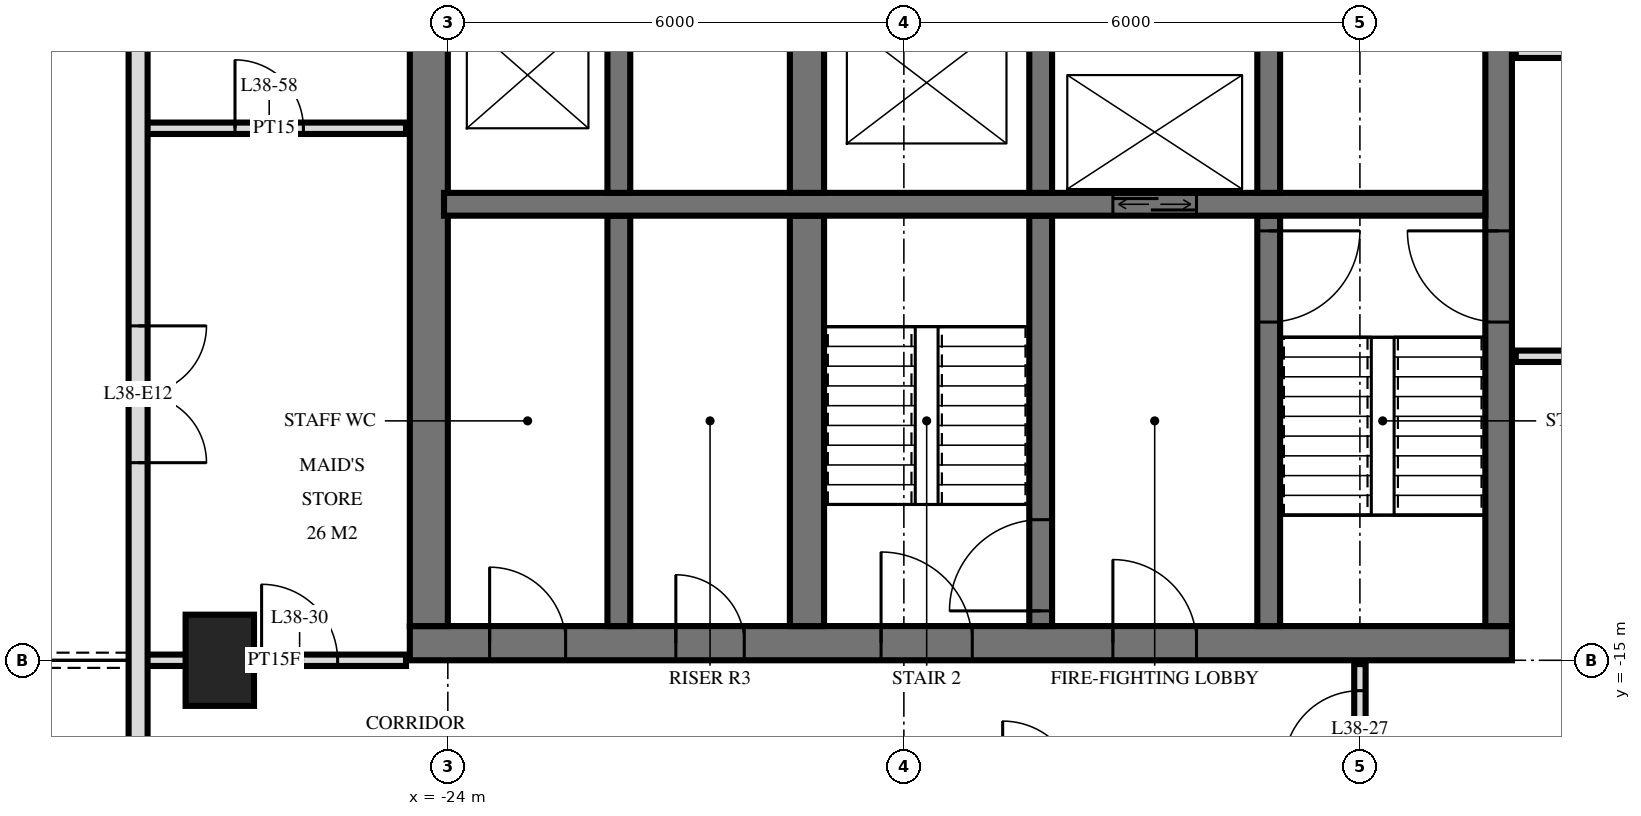
"""IFC4 building model, lengths in metres.
Left out: names, types, materials, properties, quantities, classifications, styles, units other than length and angle.
Written with IfcOpenShell. Run it as: python <this file> out.ifc"""

import sys

from ifc_helpers import new_model, si_unit, direction, frame, frame_2d, origin, origin_2d, place, context, subcontext, project, spatial, rectangle, extrude, element, fill, save


model = new_model("IFC4")
c1 = context("Model", 3, precision=1e-05, world=origin(), true_north=direction((0.0, 1.0)))
c2 = subcontext(c1, "Body", "Model", "MODEL_VIEW")
j1 = project(units=[si_unit("LENGTHUNIT", "METRE"), si_unit("PLANEANGLEUNIT", "RADIAN")], contexts=[c1])
p1 = place(None, origin())
s1 = spatial("IfcSite", under=j1, at=p1, CompositionType="ELEMENT")
p2 = place(p1, origin())
s2 = spatial("IfcBuilding", under=s1, at=p2, CompositionType="ELEMENT")
p3 = place(p2, frame((0.0, 0.0, 148.8)))
s3 = spatial("IfcBuildingStorey", under=s2, at=p3, CompositionType="ELEMENT", Elevation=148.8)
p4 = place(p3, frame((-27.0, -15.0, 0.0), z_axis=(0.0, 0.0, 1.0), x_axis=(0.0, 1.0, 0.0)))
e1 = element("IfcColumn", 1, at=p4, inside=s3, PredefinedType="COLUMN", context=c2, shape_type="SweptSolid", body=[
    extrude(rectangle(XDim=1.2, YDim=0.9, at=origin_2d()), origin(), (0.0, 0.0, 1.0), 3.6),
])
p5 = place(p3, frame((-24.5, -14.775, 0.0), z_axis=(0.0, 0.0, 1.0), x_axis=(1.0, 0.0, 0.0)))
e2 = element("IfcWall", 2, at=p5, inside=s3, PredefinedType="SHEAR", context=c2, shape_type="SweptSolid", body=[
    extrude(rectangle(XDim=14.5, YDim=0.45, at=frame_2d((7.25, 0.0))), origin(), (0.0, 0.0, 1.0), 3.6),
])
p6 = place(p5, frame((6.2, 0.0, 0.0)))
e3 = element("IfcOpeningElement", 3, at=p6, cuts=e2, PredefinedType="OPENING", context=c2, shape_type="SweptSolid", body=[
    extrude(rectangle(XDim=1.2, YDim=2.1, at=frame_2d((0.6, 1.05))), frame((0.0, 0.235, 0.0), z_axis=(0.0, -1.0, 0.0), x_axis=(1.0, 0.0, 0.0)), (0.0, 0.0, 1.0), 0.47),
])
p7 = place(p5, frame((9.25, 0.0, 0.0)))
e4 = element("IfcOpeningElement", 4, at=p7, cuts=e2, PredefinedType="OPENING", context=c2, shape_type="SweptSolid", body=[
    extrude(rectangle(XDim=1.1, YDim=2.1, at=frame_2d((0.55, 1.05))), frame((0.0, 0.235, 0.0), z_axis=(0.0, -1.0, 0.0), x_axis=(1.0, 0.0, 0.0)), (0.0, 0.0, 1.0), 0.47),
])
p8 = place(p5, frame((3.5, 0.0, 0.0)))
e5 = element("IfcOpeningElement", 5, at=p8, cuts=e2, PredefinedType="OPENING", context=c2, shape_type="SweptSolid", body=[
    extrude(rectangle(XDim=0.9, YDim=2.1, at=frame_2d((0.45, 1.05))), frame((0.0, 0.235, 0.0), z_axis=(0.0, -1.0, 0.0), x_axis=(1.0, 0.0, 0.0)), (0.0, 0.0, 1.0), 0.47),
])
p9 = place(p5, frame((1.05, 0.0, 0.0)))
e6 = element("IfcOpeningElement", 6, at=p9, cuts=e2, PredefinedType="OPENING", context=c2, shape_type="SweptSolid", body=[
    extrude(rectangle(XDim=1.0, YDim=2.1, at=frame_2d((0.5, 1.05))), frame((0.0, 0.235, 0.0), z_axis=(0.0, -1.0, 0.0), x_axis=(1.0, 0.0, 0.0)), (0.0, 0.0, 1.0), 0.47),
])
p10 = place(p3, frame((-10.175, -14.55, 0.0), z_axis=(0.0, 0.0, 1.0), x_axis=(0.0, 1.0, 0.0)))
e7 = element("IfcWall", 7, at=p10, inside=s3, PredefinedType="SHEAR", context=c2, shape_type="SweptSolid", body=[
    extrude(rectangle(XDim=14.1, YDim=0.35, at=frame_2d((7.05, 0.0))), origin(), (0.0, 0.0, 1.0), 3.6),
])
p11 = place(p10, frame((8.4, 0.0, 0.0)))
e8 = element("IfcOpeningElement", 8, at=p11, cuts=e7, PredefinedType="OPENING", context=c2, shape_type="SweptSolid", body=[
    extrude(rectangle(XDim=1.4, YDim=2.4, at=frame_2d((0.7, 1.2))), frame((0.0, 0.185, 0.0), z_axis=(0.0, -1.0, 0.0), x_axis=(1.0, 0.0, 0.0)), (0.0, 0.0, 1.0), 0.37),
])
p12 = place(p10, frame((10.0, 0.0, 0.0)))
e9 = element("IfcOpeningElement", 9, at=p12, cuts=e7, PredefinedType="OPENING", context=c2, shape_type="SweptSolid", body=[
    extrude(rectangle(XDim=1.4, YDim=2.4, at=frame_2d((0.7, 1.2))), frame((0.0, 0.185, 0.0), z_axis=(0.0, -1.0, 0.0), x_axis=(1.0, 0.0, 0.0)), (0.0, 0.0, 1.0), 0.37),
])
p13 = place(p10, frame((4.0, 0.0, 0.0)))
e10 = element("IfcOpeningElement", 10, at=p13, cuts=e7, PredefinedType="OPENING", context=c2, shape_type="SweptSolid", body=[
    extrude(rectangle(XDim=1.2, YDim=2.1, at=frame_2d((0.6, 1.05))), frame((0.0, 0.185, 0.0), z_axis=(0.0, -1.0, 0.0), x_axis=(1.0, 0.0, 0.0)), (0.0, 0.0, 1.0), 0.37),
])
p14 = place(p3, frame((-24.25, -14.55, 0.0), z_axis=(0.0, 0.0, 1.0), x_axis=(0.0, 1.0, 0.0)))
e11 = element("IfcWall", 11, at=p14, inside=s3, PredefinedType="SHEAR", context=c2, shape_type="SweptSolid", body=[
    extrude(rectangle(XDim=14.1, YDim=0.5, at=frame_2d((7.05, 0.0))), origin(), (0.0, 0.0, 1.0), 3.6),
])
p15 = place(p3, frame((-24.05, -9.0, 0.0), z_axis=(0.0, 0.0, 1.0), x_axis=(1.0, 0.0, 0.0)))
e12 = element("IfcWall", 12, at=p15, inside=s3, PredefinedType="SHEAR", context=c2, shape_type="SweptSolid", body=[
    extrude(rectangle(XDim=13.7, YDim=0.3, at=frame_2d((6.85, 0.0))), origin(), (0.0, 0.0, 1.0), 3.6),
])
p16 = place(p15, frame((8.8, 0.0, 0.0)))
e13 = element("IfcOpeningElement", 13, at=p16, cuts=e12, PredefinedType="OPENING", context=c2, shape_type="SweptSolid", body=[
    extrude(rectangle(XDim=1.1, YDim=2.1, at=frame_2d((0.55, 1.05))), frame((0.0, 0.16, 0.0), z_axis=(0.0, -1.0, 0.0), x_axis=(1.0, 0.0, 0.0)), (0.0, 0.0, 1.0), 0.32),
])
p17 = place(p3, frame((-13.2, -8.85, 0.0), z_axis=(0.0, 0.0, 1.0), x_axis=(0.0, 1.0, 0.0)))
e14 = element("IfcWall", 14, at=p17, inside=s3, PredefinedType="SHEAR", context=c2, shape_type="SweptSolid", body=[
    extrude(rectangle(XDim=2.3, YDim=0.3, at=frame_2d((1.15, 0.0))), origin(), (0.0, 0.0, 1.0), 3.6),
])
p18 = place(p3, frame((-13.2, -14.55, 0.0), z_axis=(0.0, 0.0, 1.0), x_axis=(0.0, 1.0, 0.0)))
e15 = element("IfcWall", 15, at=p18, inside=s3, PredefinedType="SHEAR", context=c2, shape_type="SweptSolid", body=[
    extrude(rectangle(XDim=5.4, YDim=0.3, at=frame_2d((2.7, 0.0))), origin(), (0.0, 0.0, 1.0), 3.6),
])
p19 = place(p18, frame((4.0, 0.0, 0.0)))
e16 = element("IfcOpeningElement", 16, at=p19, cuts=e15, PredefinedType="OPENING", context=c2, shape_type="SweptSolid", body=[
    extrude(rectangle(XDim=1.2, YDim=2.1, at=frame_2d((0.6, 1.05))), frame((0.0, 0.16, 0.0), z_axis=(0.0, -1.0, 0.0), x_axis=(1.0, 0.0, 0.0)), (0.0, 0.0, 1.0), 0.32),
])
p20 = place(p3, frame((-16.2, -8.85, 0.0), z_axis=(0.0, 0.0, 1.0), x_axis=(0.0, 1.0, 0.0)))
e17 = element("IfcWall", 17, at=p20, inside=s3, PredefinedType="SHEAR", context=c2, shape_type="SweptSolid", body=[
    extrude(rectangle(XDim=2.3, YDim=0.3, at=frame_2d((1.15, 0.0))), origin(), (0.0, 0.0, 1.0), 3.6),
])
p21 = place(p3, frame((-16.2, -14.55, 0.0), z_axis=(0.0, 0.0, 1.0), x_axis=(0.0, 1.0, 0.0)))
e18 = element("IfcWall", 18, at=p21, inside=s3, PredefinedType="SHEAR", context=c2, shape_type="SweptSolid", body=[
    extrude(rectangle(XDim=5.4, YDim=0.3, at=frame_2d((2.7, 0.0))), origin(), (0.0, 0.0, 1.0), 3.6),
])
p22 = place(p21, frame((0.2, 0.0, 0.0)))
e19 = element("IfcOpeningElement", 19, at=p22, cuts=e18, PredefinedType="OPENING", context=c2, shape_type="SweptSolid", body=[
    extrude(rectangle(XDim=1.2, YDim=2.1, at=frame_2d((0.6, 1.05))), frame((0.0, 0.16, 0.0), z_axis=(0.0, -1.0, 0.0), x_axis=(1.0, 0.0, 0.0)), (0.0, 0.0, 1.0), 0.32),
])
p23 = place(p3, frame((-19.275, -8.85, 0.0), z_axis=(0.0, 0.0, 1.0), x_axis=(0.0, 1.0, 0.0)))
e20 = element("IfcWall", 20, at=p23, inside=s3, PredefinedType="SHEAR", context=c2, shape_type="SweptSolid", body=[
    extrude(rectangle(XDim=2.3, YDim=0.45, at=frame_2d((1.15, 0.0))), origin(), (0.0, 0.0, 1.0), 3.6),
])
p24 = place(p3, frame((-19.275, -14.55, 0.0), z_axis=(0.0, 0.0, 1.0), x_axis=(0.0, 1.0, 0.0)))
e21 = element("IfcWall", 21, at=p24, inside=s3, PredefinedType="SHEAR", context=c2, shape_type="SweptSolid", body=[
    extrude(rectangle(XDim=5.4, YDim=0.45, at=frame_2d((2.7, 0.0))), origin(), (0.0, 0.0, 1.0), 3.6),
])
p25 = place(p3, frame((-21.75, -8.85, 0.0), z_axis=(0.0, 0.0, 1.0), x_axis=(0.0, 1.0, 0.0)))
e22 = element("IfcWall", 22, at=p25, inside=s3, PredefinedType="SHEAR", context=c2, shape_type="SweptSolid", body=[
    extrude(rectangle(XDim=2.3, YDim=0.3, at=frame_2d((1.15, 0.0))), origin(), (0.0, 0.0, 1.0), 3.6),
])
p26 = place(p3, frame((-21.75, -14.55, 0.0), z_axis=(0.0, 0.0, 1.0), x_axis=(0.0, 1.0, 0.0)))
e23 = element("IfcWall", 23, at=p26, inside=s3, PredefinedType="SHEAR", context=c2, shape_type="SweptSolid", body=[
    extrude(rectangle(XDim=5.4, YDim=0.3, at=frame_2d((2.7, 0.0))), origin(), (0.0, 0.0, 1.0), 3.6),
])
p27 = place(p3, frame((-28.075, -3.325, 0.0), z_axis=(0.0, 0.0, 1.0), x_axis=(0.0, -1.0, 0.0)))
e24 = element("IfcWall", 24, at=p27, inside=s3, PredefinedType="SOLIDWALL", context=c2, shape_type="SweptSolid", body=[
    extrude(rectangle(XDim=25.951, YDim=0.25, at=frame_2d((12.975, 0.0))), origin(), (0.0, 0.0, 1.0), 3.32),
])
p28 = place(p27, frame((7.275, 0.0, 0.0)))
e25 = element("IfcOpeningElement", 25, at=p28, cuts=e24, PredefinedType="OPENING", context=c2, shape_type="SweptSolid", body=[
    extrude(rectangle(XDim=1.8, YDim=2.4, at=frame_2d((0.9, 1.2))), frame((0.0, 0.135, 0.0), z_axis=(0.0, -1.0, 0.0), x_axis=(1.0, 0.0, 0.0)), (0.0, 0.0, 1.0), 0.27),
])
p29 = place(p27, frame((18.175, 0.0, 0.0)))
e26 = element("IfcOpeningElement", 26, at=p29, cuts=e24, PredefinedType="OPENING", context=c2, shape_type="SweptSolid", body=[
    extrude(rectangle(XDim=1.8, YDim=2.4, at=frame_2d((0.9, 1.2))), frame((0.0, 0.135, 0.0), z_axis=(0.0, -1.0, 0.0), x_axis=(1.0, 0.0, 0.0)), (0.0, 0.0, 1.0), 0.27),
])
p30 = place(p27, frame((21.075, 0.0, 0.0)))
e27 = element("IfcOpeningElement", 27, at=p30, cuts=e24, PredefinedType="OPENING", context=c2, shape_type="SweptSolid", body=[
    extrude(rectangle(XDim=1.8, YDim=2.4, at=frame_2d((0.9, 1.2))), frame((0.0, 0.135, 0.0), z_axis=(0.0, -1.0, 0.0), x_axis=(1.0, 0.0, 0.0)), (0.0, 0.0, 1.0), 0.27),
])
p31 = place(p27, frame((23.825, 0.0, 0.3)))
e28 = element("IfcOpeningElement", 28, at=p31, cuts=e24, PredefinedType="OPENING", context=c2, shape_type="SweptSolid", body=[
    extrude(rectangle(XDim=1.8, YDim=2.1, at=frame_2d((0.9, 1.05))), frame((0.0, 0.135, 0.0), z_axis=(0.0, -1.0, 0.0), x_axis=(1.0, 0.0, 0.0)), (0.0, 0.0, 1.0), 0.27),
])
p32 = place(p3, frame((-12.0, -16.8, 0.0), z_axis=(0.0, 0.0, 1.0), x_axis=(0.0, 1.0, 0.0)))
e29 = element("IfcWall", 29, at=p32, inside=s3, PredefinedType="PARTITIONING", context=c2, shape_type="SweptSolid", body=[
    extrude(rectangle(XDim=1.75, YDim=0.15, at=frame_2d((0.875, 0.0))), origin(), (0.0, 0.0, 1.0), 3.32),
])
p33 = place(p32, frame((0.4, 0.0, 0.0)))
e30 = element("IfcOpeningElement", 30, at=p33, cuts=e29, PredefinedType="OPENING", context=c2, shape_type="SweptSolid", body=[
    extrude(rectangle(XDim=1.0, YDim=2.1, at=frame_2d((0.5, 1.05))), frame((0.0, 0.085, 0.0), z_axis=(0.0, -1.0, 0.0), x_axis=(1.0, 0.0, 0.0)), (0.0, 0.0, 1.0), 0.17),
])
p34 = place(p3, frame((-28.02, -15.0, 0.0), z_axis=(0.0, 0.0, 1.0), x_axis=(1.0, 0.0, 0.0)))
e31 = element("IfcWall", 31, at=p34, inside=s3, PredefinedType="PARTITIONING", context=c2, shape_type="SweptSolid", body=[
    extrude(rectangle(XDim=3.47, YDim=0.15, at=frame_2d((1.735, 0.0))), origin(), (0.0, 0.0, 1.0), 3.32),
])
p35 = place(p34, frame((1.57, 0.0, 0.0)))
e32 = element("IfcOpeningElement", 32, at=p35, cuts=e31, PredefinedType="OPENING", context=c2, shape_type="SweptSolid", body=[
    extrude(rectangle(XDim=1.0, YDim=2.1, at=frame_2d((0.5, 1.05))), frame((0.0, 0.085, 0.0), z_axis=(0.0, -1.0, 0.0), x_axis=(1.0, 0.0, 0.0)), (0.0, 0.0, 1.0), 0.17),
])
p36 = place(p3, frame((-9.95, -11.0, 0.0), z_axis=(0.0, 0.0, 1.0), x_axis=(1.0, 0.0, 0.0)))
e33 = element("IfcWall", 33, at=p36, inside=s3, PredefinedType="PARTITIONING", context=c2, shape_type="SweptSolid", body=[
    extrude(rectangle(XDim=19.9, YDim=0.15, at=frame_2d((9.95, 0.0))), origin(), (0.0, 0.0, 1.0), 3.32),
])
p37 = place(p36, frame((9.45, 0.0, 0.0)))
e34 = element("IfcOpeningElement", 34, at=p37, cuts=e33, PredefinedType="OPENING", context=c2, shape_type="SweptSolid", body=[
    extrude(rectangle(XDim=1.0, YDim=2.1, at=frame_2d((0.5, 1.05))), frame((0.0, 0.085, 0.0), z_axis=(0.0, -1.0, 0.0), x_axis=(1.0, 0.0, 0.0)), (0.0, 0.0, 1.0), 0.17),
])
p38 = place(p36, frame((3.45, 0.0, 0.0)))
e35 = element("IfcOpeningElement", 35, at=p38, cuts=e33, PredefinedType="OPENING", context=c2, shape_type="SweptSolid", body=[
    extrude(rectangle(XDim=1.0, YDim=2.1, at=frame_2d((0.5, 1.05))), frame((0.0, 0.085, 0.0), z_axis=(0.0, -1.0, 0.0), x_axis=(1.0, 0.0, 0.0)), (0.0, 0.0, 1.0), 0.17),
])
p39 = place(p3, frame((-28.02, -8.0, 0.0), z_axis=(0.0, 0.0, 1.0), x_axis=(1.0, 0.0, 0.0)))
e36 = element("IfcWall", 36, at=p39, inside=s3, PredefinedType="PARTITIONING", context=c2, shape_type="SweptSolid", body=[
    extrude(rectangle(XDim=3.47, YDim=0.15, at=frame_2d((1.735, 0.0))), origin(), (0.0, 0.0, 1.0), 3.32),
])
p40 = place(p39, frame((1.22, 0.0, 0.0)))
e37 = element("IfcOpeningElement", 37, at=p40, cuts=e36, PredefinedType="OPENING", context=c2, shape_type="SweptSolid", body=[
    extrude(rectangle(XDim=0.9, YDim=2.1, at=frame_2d((0.45, 1.05))), frame((0.0, 0.085, 0.0), z_axis=(0.0, -1.0, 0.0), x_axis=(1.0, 0.0, 0.0)), (0.0, 0.0, 1.0), 0.17),
])
p41 = place(p3, frame((-9.95, -7.0, 0.0), z_axis=(0.0, 0.0, 1.0), x_axis=(1.0, 0.0, 0.0)))
e38 = element("IfcWall", 38, at=p41, inside=s3, PredefinedType="PARTITIONING", context=c2, shape_type="SweptSolid", body=[
    extrude(rectangle(XDim=19.9, YDim=0.15, at=frame_2d((9.95, 0.0))), origin(), (0.0, 0.0, 1.0), 3.32),
])
p42 = place(p41, frame((9.45, 0.0, 0.0)))
e39 = element("IfcOpeningElement", 39, at=p42, cuts=e38, PredefinedType="OPENING", context=c2, shape_type="SweptSolid", body=[
    extrude(rectangle(XDim=1.0, YDim=2.1, at=frame_2d((0.5, 1.05))), frame((0.0, 0.085, 0.0), z_axis=(0.0, -1.0, 0.0), x_axis=(1.0, 0.0, 0.0)), (0.0, 0.0, 1.0), 0.17),
])
p43 = place(p41, frame((15.45, 0.0, 0.0)))
e40 = element("IfcOpeningElement", 40, at=p43, cuts=e38, PredefinedType="OPENING", context=c2, shape_type="SweptSolid", body=[
    extrude(rectangle(XDim=1.0, YDim=2.1, at=frame_2d((0.5, 1.05))), frame((0.0, 0.085, 0.0), z_axis=(0.0, -1.0, 0.0), x_axis=(1.0, 0.0, 0.0)), (0.0, 0.0, 1.0), 0.17),
])
p44 = place(p28, origin())
e41 = element("IfcDoor", 41, at=p44, inside=s3, OperationType="DOUBLE_DOOR_SINGLE_SWING", PredefinedType="DOOR", context=c2, shape_type="SweptSolid", body=[
    extrude(rectangle(XDim=1.8, YDim=2.4, at=frame_2d((0.9, 1.2))), frame((0.0, 0.025, 0.0), z_axis=(0.0, -1.0, 0.0), x_axis=(1.0, 0.0, 0.0)), (0.0, 0.0, 1.0), 0.05),
])
fill(e25, e41)
p45 = place(p16, origin())
e42 = element("IfcDoor", 42, at=p45, inside=s3, OperationType="DOUBLE_DOOR_SLIDING", PredefinedType="USERDEFINED", context=c2, shape_type="SweptSolid", body=[
    extrude(rectangle(XDim=1.1, YDim=2.1, at=frame_2d((0.55, 1.05))), frame((0.0, 0.025, 0.0), z_axis=(0.0, -1.0, 0.0), x_axis=(1.0, 0.0, 0.0)), (0.0, 0.0, 1.0), 0.05),
])
fill(e13, e42)
p46 = place(p13, origin())
e43 = element("IfcDoor", 43, at=p46, inside=s3, OperationType="SINGLE_SWING_LEFT", PredefinedType="DOOR", context=c2, shape_type="SweptSolid", body=[
    extrude(rectangle(XDim=1.2, YDim=2.1, at=frame_2d((0.6, 1.05))), frame((0.0, 0.025, 0.0), z_axis=(0.0, -1.0, 0.0), x_axis=(1.0, 0.0, 0.0)), (0.0, 0.0, 1.0), 0.05),
])
fill(e10, e43)
p47 = place(p6, origin())
e44 = element("IfcDoor", 44, at=p47, inside=s3, OperationType="SINGLE_SWING_RIGHT", PredefinedType="DOOR", context=c2, shape_type="SweptSolid", body=[
    extrude(rectangle(XDim=1.2, YDim=2.1, at=frame_2d((0.6, 1.05))), frame((0.0, 0.025, 0.0), z_axis=(0.0, -1.0, 0.0), x_axis=(1.0, 0.0, 0.0)), (0.0, 0.0, 1.0), 0.05),
])
fill(e3, e44)
p48 = place(p7, origin())
e45 = element("IfcDoor", 45, at=p48, inside=s3, OperationType="SINGLE_SWING_RIGHT", PredefinedType="DOOR", context=c2, shape_type="SweptSolid", body=[
    extrude(rectangle(XDim=1.1, YDim=2.1, at=frame_2d((0.55, 1.05))), frame((0.0, 0.025, 0.0), z_axis=(0.0, -1.0, 0.0), x_axis=(1.0, 0.0, 0.0)), (0.0, 0.0, 1.0), 0.05),
])
fill(e4, e45)
p49 = place(p8, origin())
e46 = element("IfcDoor", 46, at=p49, inside=s3, OperationType="SINGLE_SWING_RIGHT", PredefinedType="DOOR", context=c2, shape_type="SweptSolid", body=[
    extrude(rectangle(XDim=0.9, YDim=2.1, at=frame_2d((0.45, 1.05))), frame((0.0, 0.025, 0.0), z_axis=(0.0, -1.0, 0.0), x_axis=(1.0, 0.0, 0.0)), (0.0, 0.0, 1.0), 0.05),
])
fill(e5, e46)
p50 = place(p9, origin())
e47 = element("IfcDoor", 47, at=p50, inside=s3, OperationType="SINGLE_SWING_RIGHT", PredefinedType="DOOR", context=c2, shape_type="SweptSolid", body=[
    extrude(rectangle(XDim=1.0, YDim=2.1, at=frame_2d((0.5, 1.05))), frame((0.0, 0.025, 0.0), z_axis=(0.0, -1.0, 0.0), x_axis=(1.0, 0.0, 0.0)), (0.0, 0.0, 1.0), 0.05),
])
fill(e6, e47)
p51 = place(p19, frame((0.6, 0.0, 0.0), z_axis=(0.0, 0.0, 1.0), x_axis=(-1.0, 0.0, 0.0)))
e48 = element("IfcDoor", 48, at=p51, inside=s3, OperationType="SINGLE_SWING_RIGHT", PredefinedType="DOOR", context=c2, shape_type="SweptSolid", body=[
    extrude(rectangle(XDim=1.2, YDim=2.1, at=frame_2d((0.0, 1.05))), frame((0.0, -0.025, 0.0), z_axis=(0.0, 1.0, 0.0), x_axis=(-1.0, 0.0, 0.0)), (0.0, 0.0, 1.0), 0.05),
])
fill(e16, e48)
p52 = place(p22, origin())
e49 = element("IfcDoor", 49, at=p52, inside=s3, OperationType="SINGLE_SWING_RIGHT", PredefinedType="DOOR", context=c2, shape_type="SweptSolid", body=[
    extrude(rectangle(XDim=1.2, YDim=2.1, at=frame_2d((0.6, 1.05))), frame((0.0, 0.025, 0.0), z_axis=(0.0, -1.0, 0.0), x_axis=(1.0, 0.0, 0.0)), (0.0, 0.0, 1.0), 0.05),
])
fill(e19, e49)
p53 = place(p33, origin())
e50 = element("IfcDoor", 50, at=p53, inside=s3, OperationType="SINGLE_SWING_RIGHT", PredefinedType="DOOR", context=c2, shape_type="SweptSolid", body=[
    extrude(rectangle(XDim=1.0, YDim=2.1, at=frame_2d((0.5, 1.05))), frame((0.0, 0.025, 0.0), z_axis=(0.0, -1.0, 0.0), x_axis=(1.0, 0.0, 0.0)), (0.0, 0.0, 1.0), 0.05),
])
fill(e30, e50)
p54 = place(p35, origin())
e51 = element("IfcDoor", 51, at=p54, inside=s3, OperationType="SINGLE_SWING_RIGHT", PredefinedType="DOOR", context=c2, shape_type="SweptSolid", body=[
    extrude(rectangle(XDim=1.0, YDim=2.1, at=frame_2d((0.5, 1.05))), frame((0.0, 0.025, 0.0), z_axis=(0.0, -1.0, 0.0), x_axis=(1.0, 0.0, 0.0)), (0.0, 0.0, 1.0), 0.05),
])
fill(e32, e51)
p55 = place(p40, origin())
e52 = element("IfcDoor", 52, at=p55, inside=s3, OperationType="SINGLE_SWING_RIGHT", PredefinedType="DOOR", context=c2, shape_type="SweptSolid", body=[
    extrude(rectangle(XDim=0.9, YDim=2.1, at=frame_2d((0.45, 1.05))), frame((0.0, 0.025, 0.0), z_axis=(0.0, -1.0, 0.0), x_axis=(1.0, 0.0, 0.0)), (0.0, 0.0, 1.0), 0.05),
])
fill(e37, e52)
save(model, sys.argv[1])
